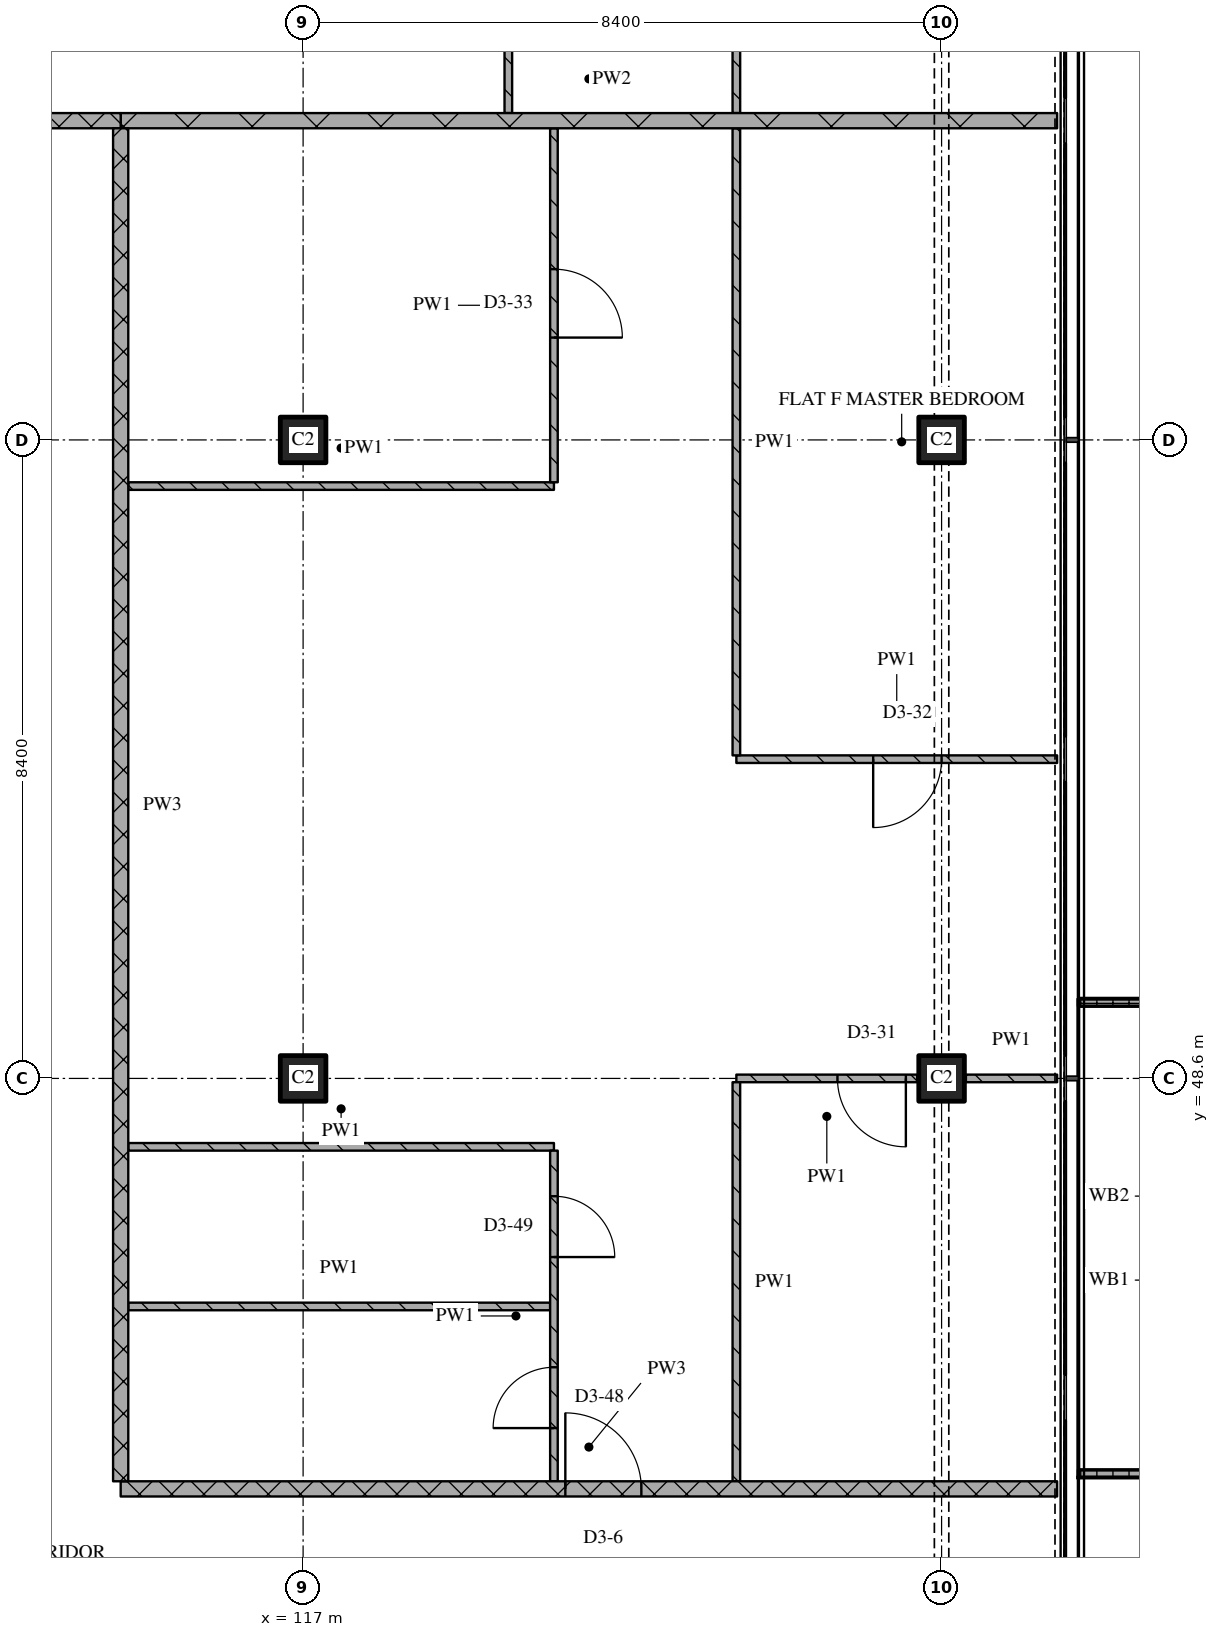
"""IFC4 building model, lengths in metres.
Left out: names, types, materials, properties, quantities, classifications, styles, units other than length and angle.
Written with IfcOpenShell. Run it as: python <this file> out.ifc"""

import sys

from ifc_helpers import new_model, si_unit, direction, frame, frame_2d, origin, origin_2d, place, context, subcontext, project, spatial, polyline, rectangle, outline, extrude, element, fill, save


model = new_model("IFC4")
c1 = context("Model", 3, precision=1e-05, world=origin(), true_north=direction((0.0, 1.0)))
c2 = subcontext(c1, "Body", "Model", "MODEL_VIEW")
j1 = project(units=[si_unit("LENGTHUNIT", "METRE"), si_unit("PLANEANGLEUNIT", "RADIAN")], contexts=[c1])
p1 = place(None, origin())
s1 = spatial("IfcSite", under=j1, at=p1, CompositionType="ELEMENT")
p2 = place(p1, origin())
s2 = spatial("IfcBuilding", under=s1, at=p2, CompositionType="ELEMENT")
p3 = place(p2, frame((0.0, 0.0, 227.1)))
s3 = spatial("IfcBuildingStorey", under=s2, at=p3, CompositionType="ELEMENT", Elevation=227.1)
for number, where, z_axis, x_axis in (
    (1, (117.0, 48.6, 0.0), (0.0, 0.0, 1.0), (1.0, 0.0, 0.0)),
    (2, (117.0, 57.0, 0.0), (0.0, 0.0, 1.0), (1.0, 0.0, 0.0)),
    (3, (125.4, 48.6, 0.0), (0.0, 0.0, 1.0), (1.0, 0.0, 0.0)),
    (4, (125.4, 57.0, 0.0), (0.0, 0.0, 1.0), (1.0, 0.0, 0.0)),
):
    element("IfcColumn", number, at=place(p3, frame(where, z_axis=z_axis, x_axis=x_axis)), inside=s3, PredefinedType="COLUMN", context=c2, shape_type="SweptSolid", body=[
        extrude(rectangle(XDim=0.6, YDim=0.6, at=origin_2d()), origin(), (0.0, 0.0, 1.0), 3.6),
    ])
p4 = place(p3, origin())
e5 = element("IfcWall", 5, at=p4, inside=s3, PredefinedType="SOLIDWALL", context=c2, shape_type="SweptSolid", body=[
    extrude(outline(polyline([(127.2, 43.35), (127.2, 43.45), (128.967, 43.45), (128.967, 49.55), (127.2, 49.55), (127.2, 49.65), (129.067, 49.65), (129.067, 43.35), (127.2, 43.35)])), origin(), (0.0, 0.0, 1.0), 1.0),
])
p5 = place(p3, frame((114.6, 43.2, 0.0), z_axis=(0.0, 0.0, 1.0), x_axis=(1.0, 0.0, 0.0)))
e6 = element("IfcWall", 6, at=p5, inside=s3, PredefinedType="PARTITIONING", context=c2, shape_type="SweptSolid", body=[
    extrude(rectangle(XDim=12.32, YDim=0.2, at=frame_2d((6.16, 0.0))), origin(), (0.0, 0.0, 1.0), 3.32),
])
p6 = place(p5, frame((5.85, 0.0, 0.0)))
e7 = element("IfcOpeningElement", 7, at=p6, cuts=e6, PredefinedType="OPENING", context=c2, shape_type="SweptSolid", body=[
    extrude(rectangle(XDim=1.0, YDim=2.1, at=frame_2d((0.5, 1.05))), frame((0.0, 0.11, 0.0), z_axis=(0.0, -1.0, 0.0), x_axis=(1.0, 0.0, 0.0)), (0.0, 0.0, 1.0), 0.22),
])
p7 = place(p3, frame((114.7, 45.6, 0.0), z_axis=(0.0, 0.0, 1.0), x_axis=(1.0, 0.0, 0.0)))
e8 = element("IfcWall", 8, at=p7, inside=s3, PredefinedType="PARTITIONING", context=c2, shape_type="SweptSolid", body=[
    extrude(rectangle(XDim=5.55, YDim=0.1, at=frame_2d((2.775, 0.0))), origin(), (0.0, 0.0, 1.0), 3.32),
])
p8 = place(p3, frame((114.7, 47.7, 0.0), z_axis=(0.0, 0.0, 1.0), x_axis=(1.0, 0.0, 0.0)))
e9 = element("IfcWall", 9, at=p8, inside=s3, PredefinedType="PARTITIONING", context=c2, shape_type="SweptSolid", body=[
    extrude(rectangle(XDim=5.6, YDim=0.1, at=frame_2d((2.8, 0.0))), origin(), (0.0, 0.0, 1.0), 3.32),
])
p9 = place(p3, frame((125.08, 48.6, 0.0), z_axis=(0.0, 0.0, 1.0), x_axis=(-1.0, 0.0, 0.0)))
e10 = element("IfcWall", 10, at=p9, inside=s3, PredefinedType="PARTITIONING", context=c2, shape_type="SweptSolid", body=[
    extrude(rectangle(XDim=2.38, YDim=0.1, at=frame_2d((1.19, 0.0))), origin(), (0.0, 0.0, 1.0), 3.32),
])
p10 = place(p9, frame((0.15, 0.0, 0.0)))
e11 = element("IfcOpeningElement", 11, at=p10, cuts=e10, PredefinedType="OPENING", context=c2, shape_type="SweptSolid", body=[
    extrude(rectangle(XDim=0.9, YDim=2.1, at=frame_2d((0.45, 1.05))), frame((0.0, 0.06, 0.0), z_axis=(0.0, -1.0, 0.0), x_axis=(1.0, 0.0, 0.0)), (0.0, 0.0, 1.0), 0.12),
])
p11 = place(p3, frame((125.72, 48.6, 0.0), z_axis=(0.0, 0.0, 1.0), x_axis=(1.0, 0.0, 0.0)))
e12 = element("IfcWall", 12, at=p11, inside=s3, PredefinedType="PARTITIONING", context=c2, shape_type="SweptSolid", body=[
    extrude(rectangle(XDim=1.2, YDim=0.1, at=frame_2d((0.6, 0.0))), origin(), (0.0, 0.0, 1.0), 3.32),
])
p12 = place(p3, frame((122.7, 52.8, 0.0), z_axis=(0.0, 0.0, 1.0), x_axis=(1.0, 0.0, 0.0)))
e13 = element("IfcWall", 13, at=p12, inside=s3, PredefinedType="PARTITIONING", context=c2, shape_type="SweptSolid", body=[
    extrude(rectangle(XDim=4.22, YDim=0.1, at=frame_2d((2.11, 0.0))), origin(), (0.0, 0.0, 1.0), 3.32),
])
p13 = place(p12, frame((1.8, 0.0, 0.0)))
e14 = element("IfcOpeningElement", 14, at=p13, cuts=e13, PredefinedType="OPENING", context=c2, shape_type="SweptSolid", body=[
    extrude(rectangle(XDim=0.9, YDim=2.1, at=frame_2d((0.45, 1.05))), frame((0.0, 0.06, 0.0), z_axis=(0.0, -1.0, 0.0), x_axis=(1.0, 0.0, 0.0)), (0.0, 0.0, 1.0), 0.12),
])
p14 = place(p3, frame((114.7, 56.393, 0.0), z_axis=(0.0, 0.0, 1.0), x_axis=(1.0, 0.0, 0.0)))
e15 = element("IfcWall", 15, at=p14, inside=s3, PredefinedType="PARTITIONING", context=c2, shape_type="SweptSolid", body=[
    extrude(rectangle(XDim=5.6, YDim=0.1, at=frame_2d((2.8, 0.0))), origin(), (0.0, 0.0, 1.0), 3.32),
])
p15 = place(p3, frame((111.0, 61.2, 0.0), z_axis=(0.0, 0.0, 1.0), x_axis=(1.0, 0.0, 0.0)))
e16 = element("IfcWall", 16, at=p15, inside=s3, PredefinedType="PARTITIONING", context=c2, shape_type="SweptSolid", body=[
    extrude(rectangle(XDim=3.6, YDim=0.2, at=frame_2d((1.8, 0.0))), origin(), (0.0, 0.0, 1.0), 3.32),
])
p16 = place(p3, frame((114.6, 61.2, 0.0), z_axis=(0.0, 0.0, 1.0), x_axis=(1.0, 0.0, 0.0)))
e17 = element("IfcWall", 17, at=p16, inside=s3, PredefinedType="PARTITIONING", context=c2, shape_type="SweptSolid", body=[
    extrude(rectangle(XDim=12.32, YDim=0.2, at=frame_2d((6.16, 0.0))), origin(), (0.0, 0.0, 1.0), 3.32),
])
p17 = place(p3, frame((114.6, 61.1, 0.0), z_axis=(0.0, 0.0, 1.0), x_axis=(0.0, -1.0, 0.0)))
e18 = element("IfcWall", 18, at=p17, inside=s3, PredefinedType="PARTITIONING", context=c2, shape_type="SweptSolid", body=[
    extrude(rectangle(XDim=17.8, YDim=0.2, at=frame_2d((8.9, 0.0))), origin(), (0.0, 0.0, 1.0), 3.32),
])
p18 = place(p3, frame((119.7, 61.3, 0.0), z_axis=(0.0, 0.0, 1.0), x_axis=(0.0, 1.0, 0.0)))
e19 = element("IfcWall", 19, at=p18, inside=s3, PredefinedType="PARTITIONING", context=c2, shape_type="SweptSolid", body=[
    extrude(rectangle(XDim=5.55, YDim=0.1, at=frame_2d((2.775, 0.0))), origin(), (0.0, 0.0, 1.0), 3.32),
])
p19 = place(p18, frame((1.023, 0.0, 0.0)))
e20 = element("IfcOpeningElement", 20, at=p19, cuts=e19, PredefinedType="OPENING", context=c2, shape_type="SweptSolid", body=[
    extrude(rectangle(XDim=0.8, YDim=2.1, at=frame_2d((0.4, 1.05))), frame((0.0, 0.06, 0.0), z_axis=(0.0, -1.0, 0.0), x_axis=(1.0, 0.0, 0.0)), (0.0, 0.0, 1.0), 0.12),
])
p20 = place(p3, frame((120.3, 43.3, 0.0), z_axis=(0.0, 0.0, 1.0), x_axis=(0.0, 1.0, 0.0)))
e21 = element("IfcWall", 21, at=p20, inside=s3, PredefinedType="PARTITIONING", context=c2, shape_type="SweptSolid", body=[
    extrude(rectangle(XDim=4.35, YDim=0.1, at=frame_2d((2.175, 0.0))), origin(), (0.0, 0.0, 1.0), 3.32),
])
p21 = place(p20, frame((0.7, 0.0, 0.0)))
e22 = element("IfcOpeningElement", 22, at=p21, cuts=e21, PredefinedType="OPENING", context=c2, shape_type="SweptSolid", body=[
    extrude(rectangle(XDim=0.8, YDim=2.1, at=frame_2d((0.4, 1.05))), frame((0.0, 0.06, 0.0), z_axis=(0.0, -1.0, 0.0), x_axis=(1.0, 0.0, 0.0)), (0.0, 0.0, 1.0), 0.12),
])
p22 = place(p20, frame((2.95, 0.0, 0.0)))
e23 = element("IfcOpeningElement", 23, at=p22, cuts=e21, PredefinedType="OPENING", context=c2, shape_type="SweptSolid", body=[
    extrude(rectangle(XDim=0.8, YDim=2.1, at=frame_2d((0.4, 1.05))), frame((0.0, 0.06, 0.0), z_axis=(0.0, -1.0, 0.0), x_axis=(1.0, 0.0, 0.0)), (0.0, 0.0, 1.0), 0.12),
])
p23 = place(p3, frame((120.3, 56.443, 0.0), z_axis=(0.0, 0.0, 1.0), x_axis=(0.0, 1.0, 0.0)))
e24 = element("IfcWall", 24, at=p23, inside=s3, PredefinedType="PARTITIONING", context=c2, shape_type="SweptSolid", body=[
    extrude(rectangle(XDim=4.657, YDim=0.1, at=frame_2d((2.329, 0.0))), origin(), (0.0, 0.0, 1.0), 3.32),
])
p24 = place(p23, frame((1.904, 0.0, 0.0)))
e25 = element("IfcOpeningElement", 25, at=p24, cuts=e24, PredefinedType="OPENING", context=c2, shape_type="SweptSolid", body=[
    extrude(rectangle(XDim=0.9, YDim=2.1, at=frame_2d((0.45, 1.05))), frame((0.0, 0.06, 0.0), z_axis=(0.0, -1.0, 0.0), x_axis=(1.0, 0.0, 0.0)), (0.0, 0.0, 1.0), 0.12),
])
p25 = place(p3, frame((122.7, 48.55, 0.0), z_axis=(0.0, 0.0, 1.0), x_axis=(0.0, -1.0, 0.0)))
e26 = element("IfcWall", 26, at=p25, inside=s3, PredefinedType="PARTITIONING", context=c2, shape_type="SweptSolid", body=[
    extrude(rectangle(XDim=5.25, YDim=0.1, at=frame_2d((2.625, 0.0))), origin(), (0.0, 0.0, 1.0), 3.32),
])
p26 = place(p3, frame((122.7, 61.1, 0.0), z_axis=(0.0, 0.0, 1.0), x_axis=(0.0, -1.0, 0.0)))
e27 = element("IfcWall", 27, at=p26, inside=s3, PredefinedType="PARTITIONING", context=c2, shape_type="SweptSolid", body=[
    extrude(rectangle(XDim=8.25, YDim=0.1, at=frame_2d((4.125, 0.0))), origin(), (0.0, 0.0, 1.0), 3.32),
])
p27 = place(p3, frame((122.7, 65.35, 0.0), z_axis=(0.0, 0.0, 1.0), x_axis=(0.0, -1.0, 0.0)))
e28 = element("IfcWall", 28, at=p27, inside=s3, PredefinedType="PARTITIONING", context=c2, shape_type="SweptSolid", body=[
    extrude(rectangle(XDim=4.05, YDim=0.1, at=frame_2d((2.025, 0.0))), origin(), (0.0, 0.0, 1.0), 3.32),
])
p28 = place(p6, origin())
e29 = element("IfcDoor", 29, at=p28, inside=s3, OperationType="SINGLE_SWING_LEFT", PredefinedType="DOOR", context=c2, shape_type="SweptSolid", body=[
    extrude(rectangle(XDim=1.0, YDim=2.1, at=frame_2d((0.5, 1.05))), frame((0.0, 0.025, 0.0), z_axis=(0.0, -1.0, 0.0), x_axis=(1.0, 0.0, 0.0)), (0.0, 0.0, 1.0), 0.05),
])
fill(e7, e29)
p29 = place(p10, origin())
e30 = element("IfcDoor", 30, at=p29, inside=s3, OperationType="SINGLE_SWING_LEFT", PredefinedType="DOOR", context=c2, shape_type="SweptSolid", body=[
    extrude(rectangle(XDim=0.9, YDim=2.1, at=frame_2d((0.45, 1.05))), frame((0.0, 0.025, 0.0), z_axis=(0.0, -1.0, 0.0), x_axis=(1.0, 0.0, 0.0)), (0.0, 0.0, 1.0), 0.05),
])
fill(e11, e30)
p30 = place(p13, origin())
e31 = element("IfcDoor", 31, at=p30, inside=s3, OperationType="SINGLE_SWING_RIGHT", PredefinedType="DOOR", context=c2, shape_type="SweptSolid", body=[
    extrude(rectangle(XDim=0.9, YDim=2.1, at=frame_2d((0.45, 1.05))), frame((0.0, 0.025, 0.0), z_axis=(0.0, -1.0, 0.0), x_axis=(1.0, 0.0, 0.0)), (0.0, 0.0, 1.0), 0.05),
])
fill(e14, e31)
p31 = place(p21, origin())
e32 = element("IfcDoor", 32, at=p31, inside=s3, OperationType="SINGLE_SWING_LEFT", PredefinedType="DOOR", context=c2, shape_type="SweptSolid", body=[
    extrude(rectangle(XDim=0.8, YDim=2.1, at=frame_2d((0.4, 1.05))), frame((0.0, 0.025, 0.0), z_axis=(0.0, -1.0, 0.0), x_axis=(1.0, 0.0, 0.0)), (0.0, 0.0, 1.0), 0.05),
])
fill(e22, e32)
p32 = place(p22, origin())
e33 = element("IfcDoor", 33, at=p32, inside=s3, OperationType="SINGLE_SWING_RIGHT", PredefinedType="DOOR", context=c2, shape_type="SweptSolid", body=[
    extrude(rectangle(XDim=0.8, YDim=2.1, at=frame_2d((0.4, 1.05))), frame((0.0, 0.025, 0.0), z_axis=(0.0, -1.0, 0.0), x_axis=(1.0, 0.0, 0.0)), (0.0, 0.0, 1.0), 0.05),
])
fill(e23, e33)
p33 = place(p24, origin())
e34 = element("IfcDoor", 34, at=p33, inside=s3, OperationType="SINGLE_SWING_RIGHT", PredefinedType="DOOR", context=c2, shape_type="SweptSolid", body=[
    extrude(rectangle(XDim=0.9, YDim=2.1, at=frame_2d((0.45, 1.05))), frame((0.0, 0.025, 0.0), z_axis=(0.0, -1.0, 0.0), x_axis=(1.0, 0.0, 0.0)), (0.0, 0.0, 1.0), 0.05),
])
fill(e25, e34)
save(model, sys.argv[1])
